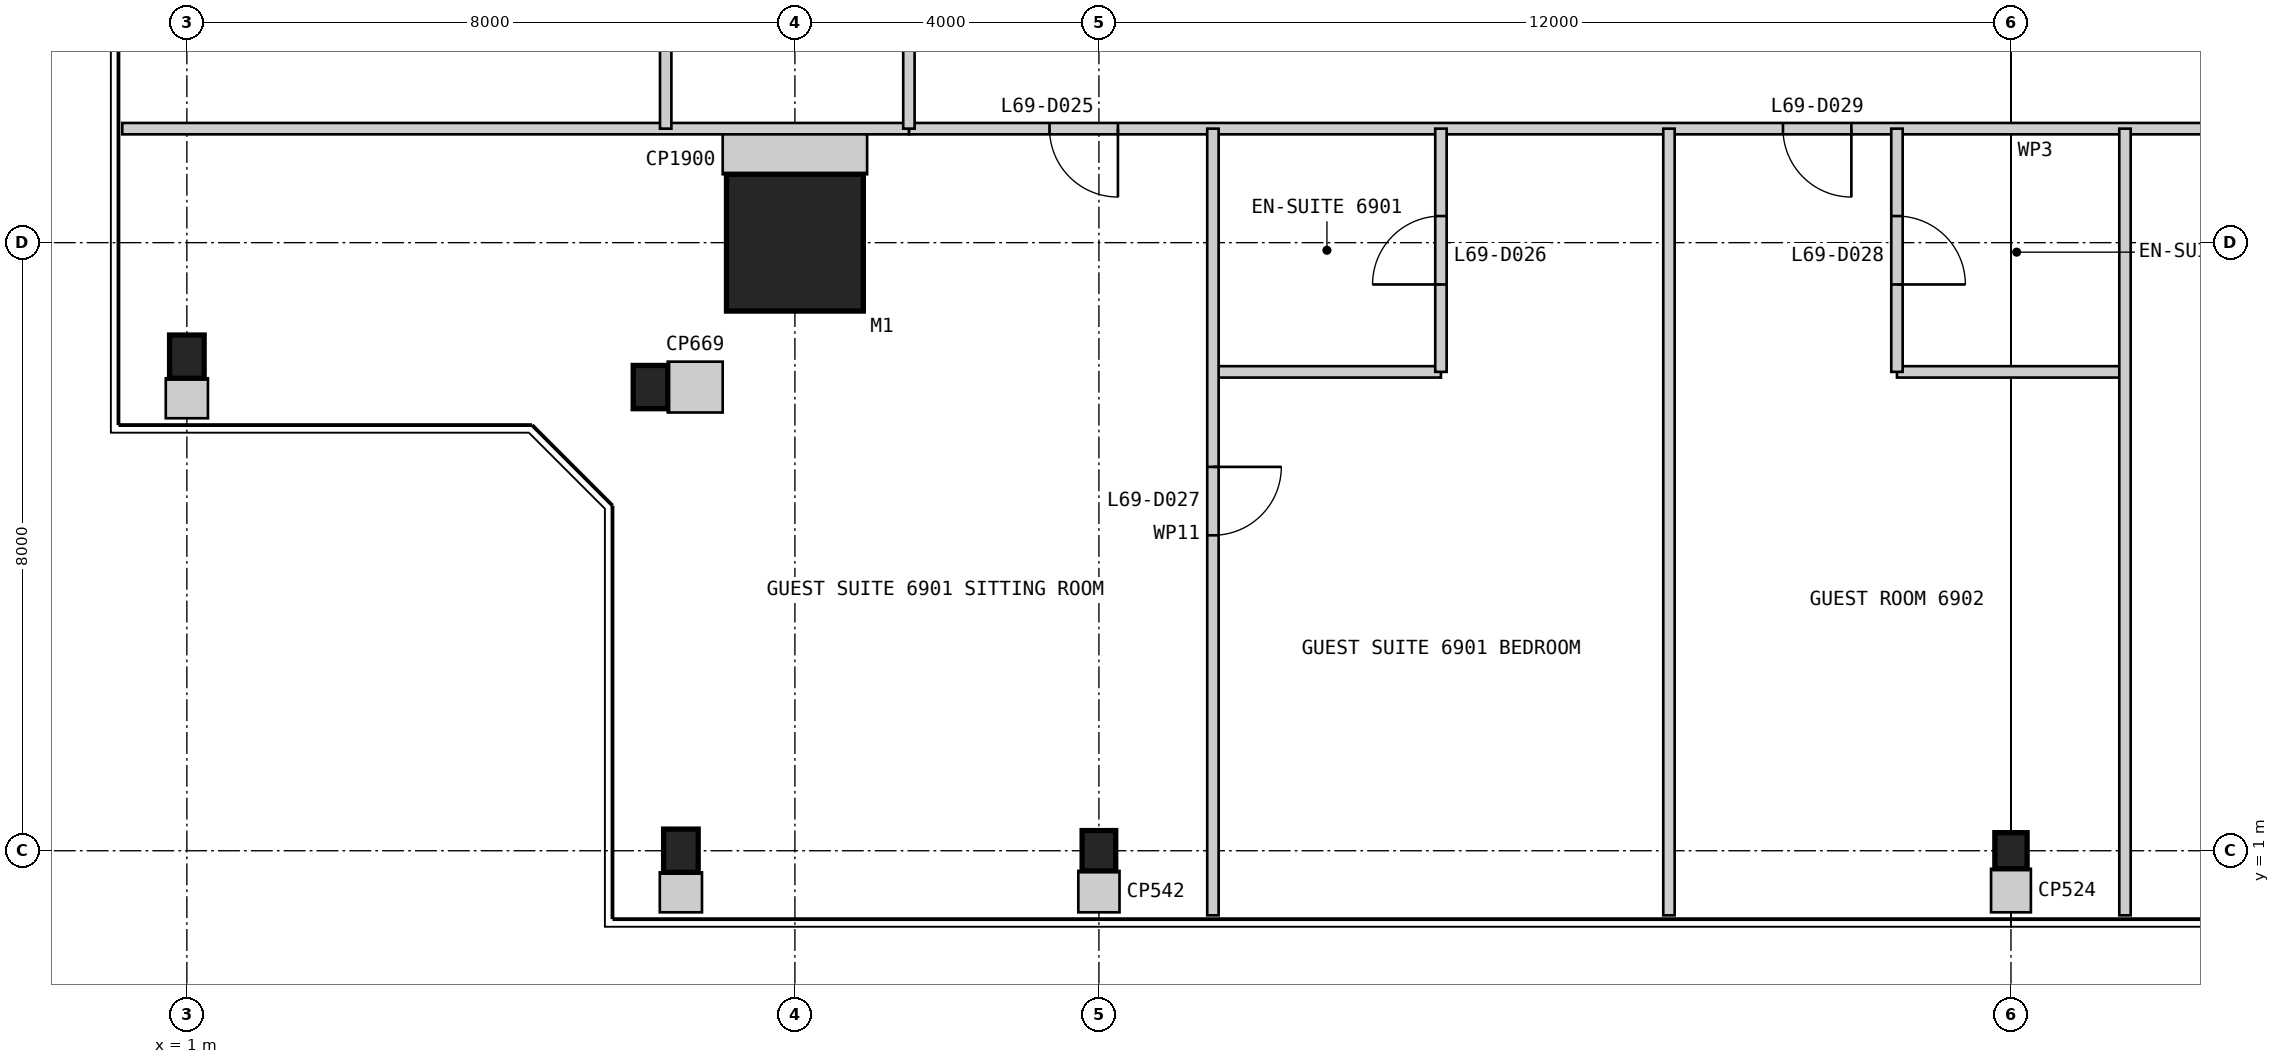
"""IFC4 building model, lengths in metres.
Left out: names, types, materials, properties, quantities, classifications, styles, units other than length and angle.
Written with IfcOpenShell. Run it as: python <this file> out.ifc"""

import sys

from ifc_helpers import new_model, si_unit, direction, frame, frame_2d, origin, origin_2d, place, context, subcontext, project, spatial, rectangle, i_section, extrude, element, fill, save


model = new_model("IFC4")
c1 = context("Model", 3, precision=1e-05, world=origin(), true_north=direction((0.0, 1.0)))
c2 = subcontext(c1, "Body", "Model", "MODEL_VIEW")
j1 = project(units=[si_unit("LENGTHUNIT", "METRE"), si_unit("PLANEANGLEUNIT", "RADIAN")], contexts=[c1])
p1 = place(None, origin())
s1 = spatial("IfcSite", under=j1, at=p1, CompositionType="ELEMENT")
p2 = place(p1, origin())
s2 = spatial("IfcBuilding", under=s1, at=p2, CompositionType="ELEMENT")
p3 = place(p2, frame((0.0, 0.0, 286.6)))
s3 = spatial("IfcBuildingStorey", under=s2, at=p3, CompositionType="ELEMENT", Elevation=286.6)
p4 = place(p3, frame((9.0, 9.0, 0.0), z_axis=(0.0, 0.0, 1.0), x_axis=(1.0, 0.0, 0.0)))
e1 = element("IfcColumn", 1, at=p4, inside=s3, PredefinedType="COLUMN", context=c2, shape_type="SweptSolid", body=[
    extrude(rectangle(XDim=1.8, YDim=1.8, at=origin_2d()), origin(), (0.0, 0.0, 1.0), 3.4),
])
p5 = place(p3, frame((7.5, 1.0, 0.0), z_axis=(0.0, 0.0, 1.0), x_axis=(1.0, 0.0, 0.0)))
e2 = element("IfcColumn", 2, at=p5, inside=s3, PredefinedType="COLUMN", context=c2, shape_type="SweptSolid", body=[
    extrude(i_section(OverallWidth=0.455, OverallDepth=0.569, WebThickness=0.078, FlangeThickness=0.125, at=origin_2d()), origin(), (0.0, 0.0, 1.0), 3.4),
])
p6 = place(p3, frame((13.0, 1.0, 0.0), z_axis=(0.0, 0.0, 1.0), x_axis=(1.0, 0.0, 0.0)))
e3 = element("IfcColumn", 3, at=p6, inside=s3, PredefinedType="COLUMN", context=c2, shape_type="SweptSolid", body=[
    extrude(i_section(OverallWidth=0.442, OverallDepth=0.531, WebThickness=0.066, FlangeThickness=0.106, at=origin_2d()), origin(), (0.0, 0.0, 1.0), 3.4),
])
p7 = place(p3, frame((25.0, 1.0, 0.0), z_axis=(0.0, 0.0, 1.0), x_axis=(1.0, 0.0, 0.0)))
e4 = element("IfcColumn", 4, at=p7, inside=s3, PredefinedType="COLUMN", context=c2, shape_type="SweptSolid", body=[
    extrude(i_section(OverallWidth=0.424, OverallDepth=0.475, WebThickness=0.048, FlangeThickness=0.077, at=origin_2d()), origin(), (0.0, 0.0, 1.0), 3.4),
])
for number, where, z_axis, x_axis in (
    (5, (1.0, 7.5, 0.0), (0.0, 0.0, 1.0), (1.0, 0.0, 0.0)),
    (6, (7.1, 7.1, 0.0), (0.0, 0.0, 1.0), (1.0, 0.0, 0.0)),
):
    element("IfcColumn", number, at=place(p3, frame(where, z_axis=z_axis, x_axis=x_axis)), inside=s3, PredefinedType="COLUMN", context=c2, shape_type="SweptSolid", body=[
        extrude(i_section(OverallWidth=0.455, OverallDepth=0.569, WebThickness=0.078, FlangeThickness=0.125, at=origin_2d()), origin(), (0.0, 0.0, 1.0), 3.4),
    ])
p8 = place(p3, frame((10.5, 10.5, 0.0), z_axis=(0.0, 0.0, 1.0), x_axis=(1.0, 0.0, 0.0)))
e7 = element("IfcWall", 7, at=p8, inside=s3, PredefinedType="PARTITIONING", context=c2, shape_type="SweptSolid", body=[
    extrude(rectangle(XDim=29.0, YDim=0.15, at=frame_2d((14.5, 0.0))), origin(), (0.0, 0.0, 1.0), 3.25),
])
p9 = place(p8, frame((1.85, 0.0, 0.0)))
e8 = element("IfcOpeningElement", 8, at=p9, cuts=e7, PredefinedType="OPENING", context=c2, shape_type="SweptSolid", body=[
    extrude(rectangle(XDim=0.9, YDim=2.1, at=frame_2d((0.45, 1.05))), frame((0.0, 0.085, 0.0), z_axis=(0.0, -1.0, 0.0), x_axis=(1.0, 0.0, 0.0)), (0.0, 0.0, 1.0), 0.17),
])
p10 = place(p8, frame((11.5, 0.0, 0.0)))
e9 = element("IfcOpeningElement", 9, at=p10, cuts=e7, PredefinedType="OPENING", context=c2, shape_type="SweptSolid", body=[
    extrude(rectangle(XDim=0.9, YDim=2.1, at=frame_2d((0.45, 1.05))), frame((0.0, 0.085, 0.0), z_axis=(0.0, -1.0, 0.0), x_axis=(1.0, 0.0, 0.0)), (0.0, 0.0, 1.0), 0.17),
])
p11 = place(p8, frame((24.1, 0.0, 0.0)))
e10 = element("IfcOpeningElement", 10, at=p11, cuts=e7, PredefinedType="OPENING", context=c2, shape_type="SweptSolid", body=[
    extrude(rectangle(XDim=0.9, YDim=2.1, at=frame_2d((0.45, 1.05))), frame((0.0, 0.085, 0.0), z_axis=(0.0, -1.0, 0.0), x_axis=(1.0, 0.0, 0.0)), (0.0, 0.0, 1.0), 0.17),
])
p12 = place(p3, frame((0.15, 10.5, 0.0), z_axis=(0.0, 0.0, 1.0), x_axis=(1.0, 0.0, 0.0)))
e11 = element("IfcWall", 11, at=p12, inside=s3, PredefinedType="PARTITIONING", context=c2, shape_type="SweptSolid", body=[
    extrude(rectangle(XDim=10.35, YDim=0.15, at=frame_2d((5.175, 0.0))), origin(), (0.0, 0.0, 1.0), 3.25),
])
p13 = place(p3, frame((14.5, 7.3, 0.0), z_axis=(0.0, 0.0, 1.0), x_axis=(1.0, 0.0, 0.0)))
e12 = element("IfcWall", 12, at=p13, inside=s3, PredefinedType="PARTITIONING", context=c2, shape_type="SweptSolid", body=[
    extrude(rectangle(XDim=3.0, YDim=0.15, at=frame_2d((1.5, 0.0))), origin(), (0.0, 0.0, 1.0), 3.25),
])
p14 = place(p3, frame((17.5, 7.3, 0.0), z_axis=(0.0, 0.0, 1.0), x_axis=(0.0, 1.0, 0.0)))
e13 = element("IfcWall", 13, at=p14, inside=s3, PredefinedType="PARTITIONING", context=c2, shape_type="SweptSolid", body=[
    extrude(rectangle(XDim=3.2, YDim=0.15, at=frame_2d((1.6, 0.0))), origin(), (0.0, 0.0, 1.0), 3.25),
])
p15 = place(p14, frame((1.15, 0.0, 0.0)))
e14 = element("IfcOpeningElement", 14, at=p15, cuts=e13, PredefinedType="OPENING", context=c2, shape_type="SweptSolid", body=[
    extrude(rectangle(XDim=0.9, YDim=2.1, at=frame_2d((0.45, 1.05))), frame((0.0, 0.085, 0.0), z_axis=(0.0, -1.0, 0.0), x_axis=(1.0, 0.0, 0.0)), (0.0, 0.0, 1.0), 0.17),
])
p16 = place(p3, frame((14.5, 0.15, 0.0), z_axis=(0.0, 0.0, 1.0), x_axis=(0.0, 1.0, 0.0)))
e15 = element("IfcWall", 15, at=p16, inside=s3, PredefinedType="PARTITIONING", context=c2, shape_type="SweptSolid", body=[
    extrude(rectangle(XDim=10.35, YDim=0.15, at=frame_2d((5.175, 0.0))), origin(), (0.0, 0.0, 1.0), 3.25),
])
p17 = place(p16, frame((5.0, 0.0, 0.0)))
e16 = element("IfcOpeningElement", 16, at=p17, cuts=e15, PredefinedType="OPENING", context=c2, shape_type="SweptSolid", body=[
    extrude(rectangle(XDim=0.9, YDim=2.1, at=frame_2d((0.45, 1.05))), frame((0.0, 0.085, 0.0), z_axis=(0.0, -1.0, 0.0), x_axis=(1.0, 0.0, 0.0)), (0.0, 0.0, 1.0), 0.17),
])
p18 = place(p3, frame((20.5, 0.15, 0.0), z_axis=(0.0, 0.0, 1.0), x_axis=(0.0, 1.0, 0.0)))
e17 = element("IfcWall", 17, at=p18, inside=s3, PredefinedType="PARTITIONING", context=c2, shape_type="SweptSolid", body=[
    extrude(rectangle(XDim=10.35, YDim=0.15, at=frame_2d((5.175, 0.0))), origin(), (0.0, 0.0, 1.0), 3.25),
])
p19 = place(p3, frame((23.5, 7.3, 0.0), z_axis=(0.0, 0.0, 1.0), x_axis=(1.0, 0.0, 0.0)))
e18 = element("IfcWall", 18, at=p19, inside=s3, PredefinedType="PARTITIONING", context=c2, shape_type="SweptSolid", body=[
    extrude(rectangle(XDim=3.0, YDim=0.15, at=frame_2d((1.5, 0.0))), origin(), (0.0, 0.0, 1.0), 3.25),
])
p20 = place(p3, frame((23.5, 7.3, 0.0), z_axis=(0.0, 0.0, 1.0), x_axis=(0.0, 1.0, 0.0)))
e19 = element("IfcWall", 19, at=p20, inside=s3, PredefinedType="PARTITIONING", context=c2, shape_type="SweptSolid", body=[
    extrude(rectangle(XDim=3.2, YDim=0.15, at=frame_2d((1.6, 0.0))), origin(), (0.0, 0.0, 1.0), 3.25),
])
p21 = place(p20, frame((1.15, 0.0, 0.0)))
e20 = element("IfcOpeningElement", 20, at=p21, cuts=e19, PredefinedType="OPENING", context=c2, shape_type="SweptSolid", body=[
    extrude(rectangle(XDim=0.9, YDim=2.1, at=frame_2d((0.45, 1.05))), frame((0.0, 0.085, 0.0), z_axis=(0.0, -1.0, 0.0), x_axis=(1.0, 0.0, 0.0)), (0.0, 0.0, 1.0), 0.17),
])
p22 = place(p3, frame((26.5, 0.15, 0.0), z_axis=(0.0, 0.0, 1.0), x_axis=(0.0, 1.0, 0.0)))
e21 = element("IfcWall", 21, at=p22, inside=s3, PredefinedType="PARTITIONING", context=c2, shape_type="SweptSolid", body=[
    extrude(rectangle(XDim=10.35, YDim=0.15, at=frame_2d((5.175, 0.0))), origin(), (0.0, 0.0, 1.0), 3.25),
])
p23 = place(p3, frame((10.5, 39.5, 0.0), z_axis=(0.0, 0.0, 1.0), x_axis=(0.0, -1.0, 0.0)))
e22 = element("IfcWall", 22, at=p23, inside=s3, PredefinedType="PARTITIONING", context=c2, shape_type="SweptSolid", body=[
    extrude(rectangle(XDim=29.0, YDim=0.15, at=frame_2d((14.5, 0.0))), origin(), (0.0, 0.0, 1.0), 3.25),
])
p24 = place(p23, frame((2.775, 0.0, 0.0)))
e23 = element("IfcOpeningElement", 23, at=p24, cuts=e22, PredefinedType="OPENING", context=c2, shape_type="SweptSolid", body=[
    extrude(rectangle(XDim=0.9, YDim=2.1, at=frame_2d((0.45, 1.05))), frame((0.0, 0.085, 0.0), z_axis=(0.0, -1.0, 0.0), x_axis=(1.0, 0.0, 0.0)), (0.0, 0.0, 1.0), 0.17),
])
p25 = place(p23, frame((11.1, 0.0, 0.0)))
e24 = element("IfcOpeningElement", 24, at=p25, cuts=e22, PredefinedType="OPENING", context=c2, shape_type="SweptSolid", body=[
    extrude(rectangle(XDim=0.9, YDim=2.1, at=frame_2d((0.45, 1.05))), frame((0.0, 0.085, 0.0), z_axis=(0.0, -1.0, 0.0), x_axis=(1.0, 0.0, 0.0)), (0.0, 0.0, 1.0), 0.17),
])
p26 = place(p23, frame((17.5, 0.0, 0.0)))
e25 = element("IfcOpeningElement", 25, at=p26, cuts=e22, PredefinedType="OPENING", context=c2, shape_type="SweptSolid", body=[
    extrude(rectangle(XDim=0.9, YDim=2.1, at=frame_2d((0.45, 1.05))), frame((0.0, 0.085, 0.0), z_axis=(0.0, -1.0, 0.0), x_axis=(1.0, 0.0, 0.0)), (0.0, 0.0, 1.0), 0.17),
])
p27 = place(p23, frame((24.5, 0.0, 0.0)))
e26 = element("IfcOpeningElement", 26, at=p27, cuts=e22, PredefinedType="OPENING", context=c2, shape_type="SweptSolid", body=[
    extrude(rectangle(XDim=0.9, YDim=2.1, at=frame_2d((0.45, 1.05))), frame((0.0, 0.085, 0.0), z_axis=(0.0, -1.0, 0.0), x_axis=(1.0, 0.0, 0.0)), (0.0, 0.0, 1.0), 0.17),
])
p28 = place(p3, frame((7.3, 13.5, 0.0), z_axis=(0.0, 0.0, 1.0), x_axis=(0.0, -1.0, 0.0)))
e27 = element("IfcWall", 27, at=p28, inside=s3, PredefinedType="PARTITIONING", context=c2, shape_type="SweptSolid", body=[
    extrude(rectangle(XDim=3.0, YDim=0.15, at=frame_2d((1.5, 0.0))), origin(), (0.0, 0.0, 1.0), 3.25),
])
p29 = place(p3, frame((9.0, 10.425, 0.0), z_axis=(0.0, 0.0, 1.0), x_axis=(0.0, -1.0, 0.0)))
e28 = element("IfcWall", 28, at=p29, inside=s3, PredefinedType="PARTITIONING", context=c2, shape_type="SweptSolid", body=[
    extrude(rectangle(XDim=0.525, YDim=1.9, at=frame_2d((0.263, 0.0))), origin(), (0.0, 0.0, 1.0), 3.25),
])
p30 = place(p3, frame((7.5, 0.19, 0.0), z_axis=(0.0, 0.0, 1.0), x_axis=(0.0, 1.0, 0.0)))
e29 = element("IfcWall", 29, at=p30, inside=s3, PredefinedType="PARTITIONING", context=c2, shape_type="SweptSolid", body=[
    extrude(rectangle(XDim=0.526, YDim=0.555, at=frame_2d((0.263, 0.0))), origin(), (0.0, 0.0, 1.0), 3.25),
])
p31 = place(p3, frame((13.0, 0.19, 0.0), z_axis=(0.0, 0.0, 1.0), x_axis=(0.0, 1.0, 0.0)))
e30 = element("IfcWall", 30, at=p31, inside=s3, PredefinedType="PARTITIONING", context=c2, shape_type="SweptSolid", body=[
    extrude(rectangle(XDim=0.545, YDim=0.542, at=frame_2d((0.272, 0.0))), origin(), (0.0, 0.0, 1.0), 3.25),
])
p32 = place(p3, frame((1.0, 6.69, 0.0), z_axis=(0.0, 0.0, 1.0), x_axis=(0.0, 1.0, 0.0)))
e31 = element("IfcWall", 31, at=p32, inside=s3, PredefinedType="PARTITIONING", context=c2, shape_type="SweptSolid", body=[
    extrude(rectangle(XDim=0.526, YDim=0.555, at=frame_2d((0.263, 0.0))), origin(), (0.0, 0.0, 1.0), 3.25),
])
p33 = place(p3, frame((8.05, 7.1, 0.0), z_axis=(0.0, 0.0, 1.0), x_axis=(-1.0, 0.0, 0.0)))
e32 = element("IfcWall", 32, at=p33, inside=s3, PredefinedType="PARTITIONING", context=c2, shape_type="SweptSolid", body=[
    extrude(rectangle(XDim=0.723, YDim=0.669, at=frame_2d((0.361, 0.0))), origin(), (0.0, 0.0, 1.0), 3.25),
])
p34 = place(p3, frame((25.0, 0.19, 0.0), z_axis=(0.0, 0.0, 1.0), x_axis=(0.0, 1.0, 0.0)))
e33 = element("IfcWall", 33, at=p34, inside=s3, PredefinedType="PARTITIONING", context=c2, shape_type="SweptSolid", body=[
    extrude(rectangle(XDim=0.573, YDim=0.524, at=frame_2d((0.286, 0.0))), origin(), (0.0, 0.0, 1.0), 3.25),
])
p35 = place(p9, frame((0.9, 0.0, 0.0), z_axis=(0.0, 0.0, 1.0), x_axis=(-1.0, 0.0, 0.0)))
e34 = element("IfcDoor", 34, at=p35, inside=s3, OperationType="SINGLE_SWING_LEFT", PredefinedType="DOOR", context=c2, shape_type="SweptSolid", body=[
    extrude(rectangle(XDim=0.9, YDim=2.1, at=frame_2d((0.45, 1.05))), frame((0.0, 0.025, 0.0), z_axis=(0.0, -1.0, 0.0), x_axis=(1.0, 0.0, 0.0)), (0.0, 0.0, 1.0), 0.05),
])
fill(e8, e34)
p36 = place(p15, origin())
e35 = element("IfcDoor", 35, at=p36, inside=s3, OperationType="SINGLE_SWING_LEFT", PredefinedType="DOOR", context=c2, shape_type="SweptSolid", body=[
    extrude(rectangle(XDim=0.9, YDim=2.1, at=frame_2d((0.45, 1.05))), frame((0.0, 0.025, 0.0), z_axis=(0.0, -1.0, 0.0), x_axis=(1.0, 0.0, 0.0)), (0.0, 0.0, 1.0), 0.05),
])
fill(e14, e35)
p37 = place(p17, frame((0.9, 0.0, 0.0), z_axis=(0.0, 0.0, 1.0), x_axis=(-1.0, 0.0, 0.0)))
e36 = element("IfcDoor", 36, at=p37, inside=s3, OperationType="SINGLE_SWING_LEFT", PredefinedType="DOOR", context=c2, shape_type="SweptSolid", body=[
    extrude(rectangle(XDim=0.9, YDim=2.1, at=frame_2d((0.45, 1.05))), frame((0.0, 0.025, 0.0), z_axis=(0.0, -1.0, 0.0), x_axis=(1.0, 0.0, 0.0)), (0.0, 0.0, 1.0), 0.05),
])
fill(e16, e36)
p38 = place(p21, frame((0.9, 0.0, 0.0), z_axis=(0.0, 0.0, 1.0), x_axis=(-1.0, 0.0, 0.0)))
e37 = element("IfcDoor", 37, at=p38, inside=s3, OperationType="SINGLE_SWING_RIGHT", PredefinedType="DOOR", context=c2, shape_type="SweptSolid", body=[
    extrude(rectangle(XDim=0.9, YDim=2.1, at=frame_2d((0.45, 1.05))), frame((0.0, 0.025, 0.0), z_axis=(0.0, -1.0, 0.0), x_axis=(1.0, 0.0, 0.0)), (0.0, 0.0, 1.0), 0.05),
])
fill(e20, e37)
p39 = place(p10, frame((0.9, 0.0, 0.0), z_axis=(0.0, 0.0, 1.0), x_axis=(-1.0, 0.0, 0.0)))
e38 = element("IfcDoor", 38, at=p39, inside=s3, OperationType="SINGLE_SWING_LEFT", PredefinedType="DOOR", context=c2, shape_type="SweptSolid", body=[
    extrude(rectangle(XDim=0.9, YDim=2.1, at=frame_2d((0.45, 1.05))), frame((0.0, 0.025, 0.0), z_axis=(0.0, -1.0, 0.0), x_axis=(1.0, 0.0, 0.0)), (0.0, 0.0, 1.0), 0.05),
])
fill(e9, e38)
save(model, sys.argv[1])
